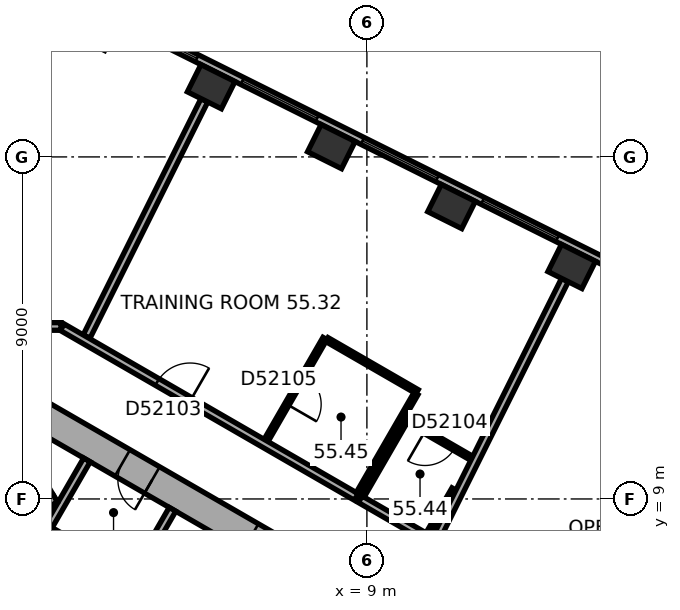
"""IFC4 building model, lengths in metres.
Left out: names, types, materials, properties, quantities, classifications, styles, units other than length and angle.
Written with IfcOpenShell. Run it as: python <this file> out.ifc"""

import sys

from ifc_helpers import new_model, si_unit, direction, frame, frame_2d, origin, origin_2d, place, context, subcontext, project, spatial, rectangle, extrude, element, fill, save


model = new_model("IFC4")
c1 = context("Model", 3, precision=1e-05, world=origin(), true_north=direction((0.0, 1.0)))
c2 = subcontext(c1, "Body", "Model", "MODEL_VIEW")
j1 = project(units=[si_unit("LENGTHUNIT", "METRE"), si_unit("PLANEANGLEUNIT", "RADIAN")], contexts=[c1])
p1 = place(None, origin())
s1 = spatial("IfcSite", under=j1, at=p1, CompositionType="ELEMENT")
p2 = place(p1, origin())
s2 = spatial("IfcBuilding", under=s1, at=p2, CompositionType="ELEMENT")
p3 = place(p2, frame((0.0, 0.0, 225.4)))
s3 = spatial("IfcBuildingStorey", under=s2, at=p3, CompositionType="ELEMENT", Elevation=225.4)
for number, where, z_axis, x_axis in (
    (1, (14.389, 15.118, 0.0), (0.0, 0.0, 1.0), (-0.895, 0.446, 0.0)),
    (2, (11.227, 16.695, 0.0), (0.0, 0.0, 1.0), (-0.895, 0.446, 0.0)),
    (3, (8.064, 18.271, 0.0), (0.0, 0.0, 1.0), (-0.895, 0.446, 0.0)),
    (4, (4.902, 19.848, 0.0), (0.0, 0.0, 1.0), (-0.895, 0.446, 0.0)),
):
    element("IfcColumn", number, at=place(p3, frame(where, z_axis=z_axis, x_axis=x_axis)), inside=s3, PredefinedType="COLUMN", context=c2, shape_type="SweptSolid", body=[
        extrude(rectangle(XDim=1.0, YDim=0.8, at=origin_2d()), origin(), (0.0, 0.0, 1.0), 3.7),
    ])
p4 = place(p3, frame((10.1, 5.6, 0.0), z_axis=(0.0, 0.0, 1.0), x_axis=(-0.866023897231, 0.500002609418, 0.0)))
e5 = element("IfcWall", 5, at=p4, inside=s3, PredefinedType="SHEAR", context=c2, shape_type="SweptSolid", body=[
    extrude(rectangle(XDim=11.894, YDim=0.8, at=frame_2d((5.947, 0.0))), origin(), (0.0, 0.0, 1.0), 3.7),
])
p5 = place(p4, frame((3.897, 0.0, 0.0)))
e6 = element("IfcOpeningElement", 6, at=p5, cuts=e5, PredefinedType="OPENING", context=c2, shape_type="SweptSolid", body=[
    extrude(rectangle(XDim=0.9, YDim=2.1, at=frame_2d((0.45, 1.05))), frame((0.0, 0.41, 0.0), z_axis=(0.0, -1.0, 0.0), x_axis=(1.0, 0.0, 0.0)), (0.0, 0.0, 1.0), 0.82),
])
p6 = place(p4, frame((7.797, 0.0, 0.0)))
e7 = element("IfcOpeningElement", 7, at=p6, cuts=e5, PredefinedType="OPENING", context=c2, shape_type="SweptSolid", body=[
    extrude(rectangle(XDim=0.9, YDim=2.1, at=frame_2d((0.45, 1.05))), frame((0.0, 0.41, 0.0), z_axis=(0.0, -1.0, 0.0), x_axis=(1.0, 0.0, 0.0)), (0.0, 0.0, 1.0), 0.82),
])
p7 = place(p3, frame((18.299, 13.727, 0.0), z_axis=(0.0, 0.0, 1.0), x_axis=(-0.894934554817, 0.44619742558, 0.0)))
e8 = element("IfcWall", 8, at=p7, inside=s3, PredefinedType="STANDARD", context=c2, shape_type="SweptSolid", body=[
    extrude(rectangle(XDim=18.841, YDim=0.2, at=frame_2d((9.421, 0.0))), origin(), (0.0, 0.0, 1.0), 3.7),
])
p8 = place(p7, frame((1.253, 0.0, 0.9)))
e9 = element("IfcOpeningElement", 9, at=p8, cuts=e8, PredefinedType="OPENING", context=c2, shape_type="SweptSolid", body=[
    extrude(rectangle(XDim=2.2, YDim=2.0, at=frame_2d((1.1, 1.0))), frame((0.0, 0.11, 0.0), z_axis=(0.0, -1.0, 0.0), x_axis=(1.0, 0.0, 0.0)), (0.0, 0.0, 1.0), 0.22),
])
p9 = place(p7, frame((4.786, 0.0, 0.9)))
e10 = element("IfcOpeningElement", 10, at=p9, cuts=e8, PredefinedType="OPENING", context=c2, shape_type="SweptSolid", body=[
    extrude(rectangle(XDim=2.2, YDim=2.0, at=frame_2d((1.1, 1.0))), frame((0.0, 0.11, 0.0), z_axis=(0.0, -1.0, 0.0), x_axis=(1.0, 0.0, 0.0)), (0.0, 0.0, 1.0), 0.22),
])
p10 = place(p7, frame((8.32, 0.0, 0.9)))
e11 = element("IfcOpeningElement", 11, at=p10, cuts=e8, PredefinedType="OPENING", context=c2, shape_type="SweptSolid", body=[
    extrude(rectangle(XDim=2.2, YDim=2.0, at=frame_2d((1.1, 1.0))), frame((0.0, 0.11, 0.0), z_axis=(0.0, -1.0, 0.0), x_axis=(1.0, 0.0, 0.0)), (0.0, 0.0, 1.0), 0.22),
])
p11 = place(p7, frame((11.854, 0.0, 0.9)))
e12 = element("IfcOpeningElement", 12, at=p11, cuts=e8, PredefinedType="OPENING", context=c2, shape_type="SweptSolid", body=[
    extrude(rectangle(XDim=2.2, YDim=2.0, at=frame_2d((1.1, 1.0))), frame((0.0, 0.11, 0.0), z_axis=(0.0, -1.0, 0.0), x_axis=(1.0, 0.0, 0.0)), (0.0, 0.0, 1.0), 0.22),
])
p12 = place(p7, frame((15.387, 0.0, 0.9)))
e13 = element("IfcOpeningElement", 13, at=p12, cuts=e8, PredefinedType="OPENING", context=c2, shape_type="SweptSolid", body=[
    extrude(rectangle(XDim=2.2, YDim=2.0, at=frame_2d((1.1, 1.0))), frame((0.0, 0.11, 0.0), z_axis=(0.0, -1.0, 0.0), x_axis=(1.0, 0.0, 0.0)), (0.0, 0.0, 1.0), 0.22),
])
p13 = place(p3, frame((7.424, 4.259, 0.0), z_axis=(0.0, 0.0, 1.0), x_axis=(-0.866026010844, 0.49999894854, 0.0)))
e14 = element("IfcWall", 14, at=p13, inside=s3, PredefinedType="PARTITIONING", context=c2, shape_type="SweptSolid", body=[
    extrude(rectangle(XDim=8.0, YDim=0.2, at=frame_2d((4.0, 0.0))), origin(), (0.0, 0.0, 1.0), 3.42),
])
for number, where, z_axis, x_axis in (
    (15, (2.784, 6.822, 0.0), (0.0, 0.0, 1.0), (0.5, 0.866, 0.0)),
    (16, (0.532, 8.122, 0.0), (0.0, 0.0, 1.0), (0.5, 0.866, 0.0)),
):
    element("IfcWall", number, at=place(p3, frame(where, z_axis=z_axis, x_axis=x_axis)), inside=s3, PredefinedType="PARTITIONING", context=c2, shape_type="SweptSolid", body=[
        extrude(rectangle(XDim=2.2, YDim=0.2, at=frame_2d((1.1, 0.0))), origin(), (0.0, 0.0, 1.0), 3.42),
    ])
p14 = place(p3, frame((0.803, 9.009, 0.0), z_axis=(0.0, 0.0, 1.0), x_axis=(-0.866028230842, -0.499995103361, 0.0)))
e17 = element("IfcWall", 17, at=p14, inside=s3, PredefinedType="PARTITIONING", context=c2, shape_type="SweptSolid", body=[
    extrude(rectangle(XDim=5.4, YDim=0.2, at=frame_2d((2.7, 0.0))), origin(), (0.0, 0.0, 1.0), 3.42),
])
p15 = place(p3, frame((0.767, 8.872, 0.0), z_axis=(0.0, 0.0, 1.0), x_axis=(-0.499994660107, 0.866028486751, 0.0)))
e18 = element("IfcWall", 18, at=p15, inside=s3, PredefinedType="PARTITIONING", context=c2, shape_type="SweptSolid", body=[
    extrude(rectangle(XDim=2.2, YDim=0.2, at=frame_2d((1.1, 0.0))), origin(), (0.0, 0.0, 1.0), 3.42),
])
p16 = place(p3, frame((6.303, 4.617, 0.0), z_axis=(0.0, 0.0, 1.0), x_axis=(-0.866027801685, 0.499995846692, 0.0)))
e19 = element("IfcWall", 19, at=p16, inside=s3, PredefinedType="SHEAR", context=c2, shape_type="SweptSolid", body=[
    extrude(rectangle(XDim=7.06, YDim=0.3, at=frame_2d((3.53, 0.0))), origin(), (0.0, 0.0, 1.0), 3.42),
])
p17 = place(p3, frame((0.95, 13.539, 0.0), z_axis=(0.0, 0.0, 1.0), x_axis=(-1.0, 0.0, 0.0)))
e20 = element("IfcWall", 20, at=p17, inside=s3, PredefinedType="PARTITIONING", context=c2, shape_type="SweptSolid", body=[
    extrude(rectangle(XDim=1.9, YDim=0.2, at=frame_2d((0.95, 0.0))), origin(), (0.0, 0.0, 1.0), 3.42),
])
p18 = place(p3, frame((4.723, 19.49, 0.0), z_axis=(0.0, 0.0, 1.0), x_axis=(-0.446186614574, -0.894939944898, 0.0)))
e21 = element("IfcWall", 21, at=p18, inside=s3, PredefinedType="PARTITIONING", context=c2, shape_type="SweptSolid", body=[
    extrude(rectangle(XDim=6.944, YDim=0.2, at=frame_2d((3.472, 0.0))), origin(), (0.0, 0.0, 1.0), 2.87),
])
p19 = place(p3, frame((6.347, 10.539, 0.0), z_axis=(0.0, 0.0, 1.0), x_axis=(0.499933790963, 0.866063626216, 0.0)))
e22 = element("IfcWall", 22, at=p19, inside=s3, PredefinedType="PARTITIONING", context=c2, shape_type="SweptSolid", body=[
    extrude(rectangle(XDim=3.1, YDim=0.12, at=frame_2d((1.55, 0.0))), origin(), (0.0, 0.0, 1.0), 3.42),
])
p20 = place(p19, frame((1.1, 0.0, 0.0)))
e23 = element("IfcOpeningElement", 23, at=p20, cuts=e22, PredefinedType="OPENING", context=c2, shape_type="SweptSolid", body=[
    extrude(rectangle(XDim=0.9, YDim=2.1, at=frame_2d((0.45, 1.05))), frame((0.0, 0.07, 0.0), z_axis=(0.0, -1.0, 0.0), x_axis=(1.0, 0.0, 0.0)), (0.0, 0.0, 1.0), 0.14),
])
p21 = place(p3, frame((7.948, 13.193, 0.0), z_axis=(0.0, 0.0, 1.0), x_axis=(0.866019409031, -0.500010383074, 0.0)))
e24 = element("IfcWall", 24, at=p21, inside=s3, PredefinedType="PARTITIONING", context=c2, shape_type="SweptSolid", body=[
    extrude(rectangle(XDim=2.74, YDim=0.12, at=frame_2d((1.37, 0.0))), origin(), (0.0, 0.0, 1.0), 3.42),
])
p22 = place(p3, frame((8.721, 9.052, 0.0), z_axis=(0.0, 0.0, 1.0), x_axis=(-0.866028125821, 0.499995285264, 0.0)))
e25 = element("IfcWall", 25, at=p22, inside=s3, PredefinedType="PARTITIONING", context=c2, shape_type="SweptSolid", body=[
    extrude(rectangle(XDim=8.934, YDim=0.2, at=frame_2d((4.467, 0.0))), origin(), (0.0, 0.0, 1.0), 3.42),
])
p23 = place(p22, frame((5.05, 0.0, 0.0)))
e26 = element("IfcOpeningElement", 26, at=p23, cuts=e25, PredefinedType="OPENING", context=c2, shape_type="SweptSolid", body=[
    extrude(rectangle(XDim=1.0, YDim=2.1, at=frame_2d((0.5, 1.05))), frame((0.0, 0.11, 0.0), z_axis=(0.0, -1.0, 0.0), x_axis=(1.0, 0.0, 0.0)), (0.0, 0.0, 1.0), 0.22),
])
p24 = place(p3, frame((8.875, 9.079, 0.0), z_axis=(0.0, 0.0, 1.0), x_axis=(0.499998129301, 0.86602648383, 0.0)))
e27 = element("IfcWall", 27, at=p24, inside=s3, PredefinedType="PARTITIONING", context=c2, shape_type="SweptSolid", body=[
    extrude(rectangle(XDim=2.3, YDim=0.12, at=frame_2d((1.15, 0.0))), origin(), (0.0, 0.0, 1.0), 3.42),
])
p25 = place(p3, frame((10.077, 11.04, 0.0), z_axis=(0.0, 0.0, 1.0), x_axis=(0.866043088465, -0.499969367985, 0.0)))
e28 = element("IfcWall", 28, at=p25, inside=s3, PredefinedType="PARTITIONING", context=c2, shape_type="SweptSolid", body=[
    extrude(rectangle(XDim=1.94, YDim=0.12, at=frame_2d((0.97, 0.0))), origin(), (0.0, 0.0, 1.0), 3.42),
])
p26 = place(p25, frame((0.52, 0.0, 0.0)))
e29 = element("IfcOpeningElement", 29, at=p26, cuts=e28, PredefinedType="OPENING", context=c2, shape_type="SweptSolid", body=[
    extrude(rectangle(XDim=0.9, YDim=2.1, at=frame_2d((0.45, 1.05))), frame((0.0, 0.07, 0.0), z_axis=(0.0, -1.0, 0.0), x_axis=(1.0, 0.0, 0.0)), (0.0, 0.0, 1.0), 0.14),
])
p27 = place(p3, frame((10.292, 11.771, 0.0), z_axis=(0.0, 0.0, 1.0), x_axis=(-0.500026023896, -0.86601037836, 0.0)))
e30 = element("IfcWall", 30, at=p27, inside=s3, PredefinedType="PARTITIONING", context=c2, shape_type="SweptSolid", body=[
    extrude(rectangle(XDim=3.04, YDim=0.12, at=frame_2d((1.52, 0.0))), origin(), (0.0, 0.0, 1.0), 3.42),
])
p28 = place(p3, frame((10.558, 7.992, 0.0), z_axis=(0.0, 0.0, 1.0), x_axis=(-0.866041268327, 0.499972520799, 0.0)))
e31 = element("IfcWall", 31, at=p28, inside=s3, PredefinedType="PARTITIONING", context=c2, shape_type="SweptSolid", body=[
    extrude(rectangle(XDim=2.0, YDim=0.2, at=frame_2d((1.0, 0.0))), origin(), (0.0, 0.0, 1.0), 3.42),
])
p29 = place(p3, frame((11.291, 9.263, 0.0), z_axis=(0.0, 0.0, 1.0), x_axis=(-0.500036664704, -0.866004234373, 0.0)))
e32 = element("IfcWall", 32, at=p29, inside=s3, PredefinedType="PARTITIONING", context=c2, shape_type="SweptSolid", body=[
    extrude(rectangle(XDim=1.368, YDim=0.12, at=frame_2d((0.684, 0.0))), origin(), (0.0, 0.0, 1.0), 3.42),
])
p30 = place(p3, frame((14.211, 14.76, 0.0), z_axis=(0.0, 0.0, 1.0), x_axis=(-0.446198490295, -0.89493402397, 0.0)))
e33 = element("IfcWall", 33, at=p30, inside=s3, PredefinedType="PARTITIONING", context=c2, shape_type="SweptSolid", body=[
    extrude(rectangle(XDim=7.602, YDim=0.2, at=frame_2d((3.801, 0.0))), origin(), (0.0, 0.0, 1.0), 3.42),
])
p31 = place(p9, origin())
e34 = element("IfcWindow", 34, at=p31, inside=s3, PartitioningType="SINGLE_PANEL", PredefinedType="WINDOW", context=c2, shape_type="SweptSolid", body=[
    extrude(rectangle(XDim=2.2, YDim=2.0, at=frame_2d((1.1, 1.0))), frame((0.0, 0.03, 0.0), z_axis=(0.0, -1.0, 0.0), x_axis=(1.0, 0.0, 0.0)), (0.0, 0.0, 1.0), 0.06),
])
fill(e10, e34)
p32 = place(p10, origin())
e35 = element("IfcWindow", 35, at=p32, inside=s3, PartitioningType="SINGLE_PANEL", PredefinedType="WINDOW", context=c2, shape_type="SweptSolid", body=[
    extrude(rectangle(XDim=2.2, YDim=2.0, at=frame_2d((1.1, 1.0))), frame((0.0, 0.03, 0.0), z_axis=(0.0, -1.0, 0.0), x_axis=(1.0, 0.0, 0.0)), (0.0, 0.0, 1.0), 0.06),
])
fill(e11, e35)
p33 = place(p11, origin())
e36 = element("IfcWindow", 36, at=p33, inside=s3, PartitioningType="SINGLE_PANEL", PredefinedType="WINDOW", context=c2, shape_type="SweptSolid", body=[
    extrude(rectangle(XDim=2.2, YDim=2.0, at=frame_2d((1.1, 1.0))), frame((0.0, 0.03, 0.0), z_axis=(0.0, -1.0, 0.0), x_axis=(1.0, 0.0, 0.0)), (0.0, 0.0, 1.0), 0.06),
])
fill(e12, e36)
p34 = place(p12, origin())
e37 = element("IfcWindow", 37, at=p34, inside=s3, PartitioningType="SINGLE_PANEL", PredefinedType="WINDOW", context=c2, shape_type="SweptSolid", body=[
    extrude(rectangle(XDim=2.2, YDim=2.0, at=frame_2d((1.1, 1.0))), frame((0.0, 0.03, 0.0), z_axis=(0.0, -1.0, 0.0), x_axis=(1.0, 0.0, 0.0)), (0.0, 0.0, 1.0), 0.06),
])
fill(e13, e37)
p35 = place(p6, origin())
e38 = element("IfcDoor", 38, at=p35, inside=s3, OperationType="SINGLE_SWING_LEFT", PredefinedType="DOOR", context=c2, shape_type="SweptSolid", body=[
    extrude(rectangle(XDim=0.9, YDim=2.1, at=frame_2d((0.45, 1.05))), frame((0.0, 0.025, 0.0), z_axis=(0.0, -1.0, 0.0), x_axis=(1.0, 0.0, 0.0)), (0.0, 0.0, 1.0), 0.05),
])
fill(e7, e38)
p36 = place(p23, origin())
e39 = element("IfcDoor", 39, at=p36, inside=s3, OperationType="SINGLE_SWING_LEFT", PredefinedType="DOOR", context=c2, shape_type="SweptSolid", body=[
    extrude(rectangle(XDim=1.0, YDim=2.1, at=frame_2d((0.5, 1.05))), frame((0.0, 0.025, 0.0), z_axis=(0.0, -1.0, 0.0), x_axis=(1.0, 0.0, 0.0)), (0.0, 0.0, 1.0), 0.05),
])
fill(e26, e39)
p37 = place(p26, origin())
e40 = element("IfcDoor", 40, at=p37, inside=s3, OperationType="SINGLE_SWING_LEFT", PredefinedType="DOOR", context=c2, shape_type="SweptSolid", body=[
    extrude(rectangle(XDim=0.9, YDim=2.1, at=frame_2d((0.45, 1.05))), frame((0.0, 0.025, 0.0), z_axis=(0.0, -1.0, 0.0), x_axis=(1.0, 0.0, 0.0)), (0.0, 0.0, 1.0), 0.05),
])
fill(e29, e40)
p38 = place(p20, origin())
e41 = element("IfcDoor", 41, at=p38, inside=s3, OperationType="SINGLE_SWING_LEFT", PredefinedType="DOOR", context=c2, shape_type="SweptSolid", body=[
    extrude(rectangle(XDim=0.9, YDim=2.1, at=frame_2d((0.45, 1.05))), frame((0.0, 0.025, 0.0), z_axis=(0.0, -1.0, 0.0), x_axis=(1.0, 0.0, 0.0)), (0.0, 0.0, 1.0), 0.05),
])
fill(e23, e41)
save(model, sys.argv[1])
